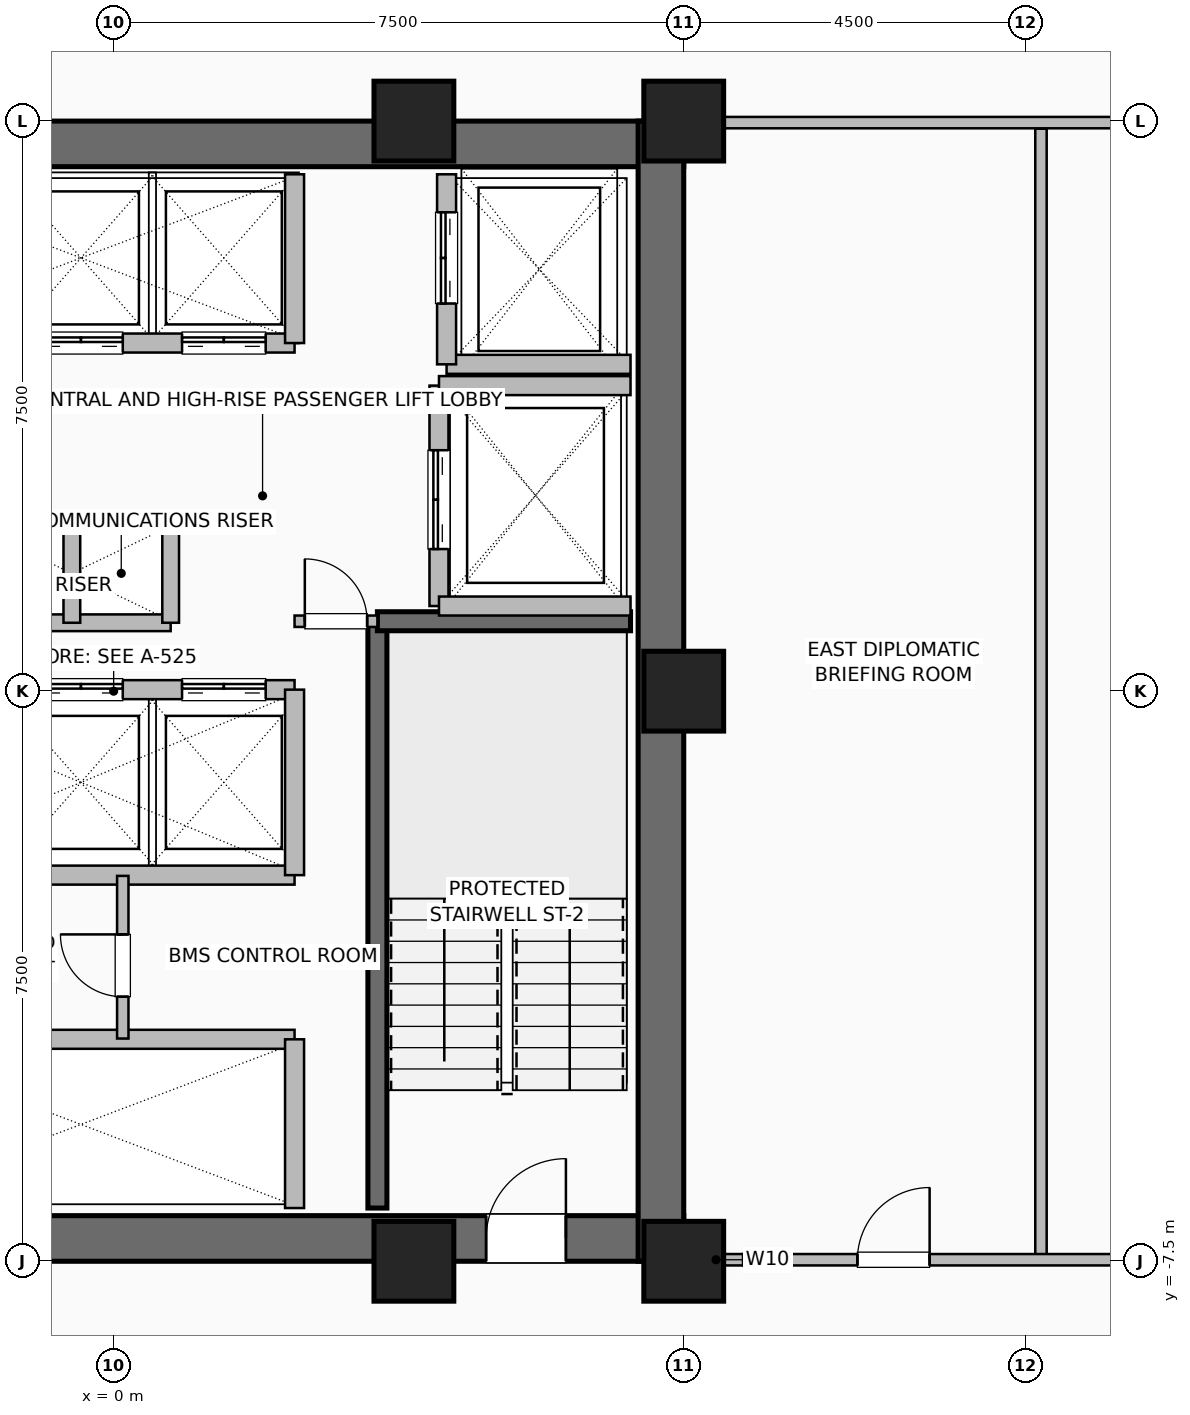
"""IFC4 building model, lengths in metres.
Left out: names, types, materials, properties, quantities, classifications, styles, units other than length and angle.
Written with IfcOpenShell. Run it as: python <this file> out.ifc"""

import sys

from ifc_helpers import new_model, si_unit, direction, frame, frame_2d, origin, origin_2d, place, context, subcontext, project, spatial, rectangle, hollow_rectangle, extrude, element, fill, save


model = new_model("IFC4")
c1 = context("Model", 3, precision=1e-05, world=origin(), true_north=direction((0.0, 1.0)))
c2 = subcontext(c1, "Body", "Model", "MODEL_VIEW")
j1 = project(units=[si_unit("LENGTHUNIT", "METRE"), si_unit("PLANEANGLEUNIT", "RADIAN")], contexts=[c1])
p1 = place(None, origin())
s1 = spatial("IfcSite", under=j1, at=p1, CompositionType="ELEMENT")
p2 = place(p1, origin())
s2 = spatial("IfcBuilding", under=s1, at=p2, CompositionType="ELEMENT")
p3 = place(p2, frame((0.0, 0.0, 97.6)))
s3 = spatial("IfcBuildingStorey", under=s2, at=p3, CompositionType="ELEMENT", Elevation=97.6)
for number, where, z_axis, x_axis in (
    (1, (3.95, -7.5, 0.0), (0.0, 0.0, 1.0), (1.0, 0.0, 0.0)),
    (2, (7.5, -7.5, 0.0), (0.0, 0.0, 1.0), (1.0, 0.0, 0.0)),
    (3, (7.5, 0.0, 0.0), (0.0, 0.0, 1.0), (1.0, 0.0, 0.0)),
    (4, (7.5, 7.5, 0.0), (0.0, 0.0, 1.0), (1.0, 0.0, 0.0)),
    (5, (3.95, 7.5, 0.0), (0.0, 0.0, 1.0), (1.0, 0.0, 0.0)),
):
    element("IfcColumn", number, at=place(p3, frame(where, z_axis=z_axis, x_axis=x_axis)), inside=s3, PredefinedType="COLUMN", context=c2, shape_type="SweptSolid", body=[
        extrude(hollow_rectangle(XDim=1.05, YDim=1.05, WallThickness=0.05, at=origin_2d()), origin(), (0.0, 0.0, 1.0), 3.6),
    ])
p4 = place(p3, frame((-7.5, -7.2, 0.0), z_axis=(0.0, 0.0, 1.0), x_axis=(1.0, 0.0, 0.0)))
e6 = element("IfcWall", 6, at=p4, inside=s3, PredefinedType="SHEAR", context=c2, shape_type="SweptSolid", body=[
    extrude(rectangle(XDim=15.0, YDim=0.6, at=frame_2d((7.5, 0.0))), origin(), (0.0, 0.0, 1.0), 3.36),
])
p5 = place(p4, frame((1.55, 0.0, 0.0)))
e7 = element("IfcOpeningElement", 7, at=p5, cuts=e6, PredefinedType="OPENING", context=c2, shape_type="SweptSolid", body=[
    extrude(rectangle(XDim=1.05, YDim=2.08, at=frame_2d((0.525, 1.04))), frame((0.0, 0.31, 0.0), z_axis=(0.0, -1.0, 0.0), x_axis=(1.0, 0.0, 0.0)), (0.0, 0.0, 1.0), 0.62),
])
p6 = place(p4, frame((12.4, 0.0, 0.0)))
e8 = element("IfcOpeningElement", 8, at=p6, cuts=e6, PredefinedType="OPENING", context=c2, shape_type="SweptSolid", body=[
    extrude(rectangle(XDim=1.05, YDim=2.08, at=frame_2d((0.525, 1.04))), frame((0.0, 0.31, 0.0), z_axis=(0.0, -1.0, 0.0), x_axis=(1.0, 0.0, 0.0)), (0.0, 0.0, 1.0), 0.62),
])
for number, where, z_axis, x_axis in (
    (9, (-7.5, 7.2, 0.0), (0.0, 0.0, 1.0), (1.0, 0.0, 0.0)),
    (10, (7.2, -7.5, 0.0), (0.0, 0.0, 1.0), (0.0, 1.0, 0.0)),
):
    element("IfcWall", number, at=place(p3, frame(where, z_axis=z_axis, x_axis=x_axis)), inside=s3, PredefinedType="SHEAR", context=c2, shape_type="SweptSolid", body=[
        extrude(rectangle(XDim=15.0, YDim=0.6, at=frame_2d((7.5, 0.0))), origin(), (0.0, 0.0, 1.0), 3.36),
    ])
p7 = place(p3, frame((3.47, -6.8, 0.0), z_axis=(0.0, 0.0, 1.0), x_axis=(0.0, 1.0, 0.0)))
e11 = element("IfcWall", 11, at=p7, inside=s3, PredefinedType="SHEAR", context=c2, shape_type="SweptSolid", body=[
    extrude(rectangle(XDim=7.72, YDim=0.25, at=frame_2d((3.86, 0.0))), origin(), (0.0, 0.0, 1.0), 3.36),
])
p8 = place(p3, frame((3.47, 0.92, 0.0), z_axis=(0.0, 0.0, 1.0), x_axis=(1.0, 0.0, 0.0)))
e12 = element("IfcWall", 12, at=p8, inside=s3, PredefinedType="SHEAR", context=c2, shape_type="SweptSolid", body=[
    extrude(rectangle(XDim=3.33, YDim=0.25, at=frame_2d((1.665, 0.0))), origin(), (0.0, 0.0, 1.0), 3.36),
])
for number, where, z_axis, x_axis in (
    (13, (-1.85, 2.2, 0.0), (0.0, 0.0, 1.0), (1.0, 0.0, 0.0)),
    (14, (-1.85, 0.9, 0.0), (0.0, 0.0, 1.0), (1.0, 0.0, 0.0)),
):
    element("IfcWall", number, at=place(p3, frame(where, z_axis=z_axis, x_axis=x_axis)), inside=s3, PredefinedType="PARTITIONING", context=c2, shape_type="SweptSolid", body=[
        extrude(rectangle(XDim=2.6, YDim=0.22, at=frame_2d((1.3, 0.0))), origin(), (0.0, 0.0, 1.0), 3.36),
    ])
for number, where, z_axis, x_axis in (
    (15, (-0.55, 0.9, 0.0), (0.0, 0.0, 1.0), (0.0, 1.0, 0.0)),
    (16, (0.75, 0.9, 0.0), (0.0, 0.0, 1.0), (0.0, 1.0, 0.0)),
):
    element("IfcWall", number, at=place(p3, frame(where, z_axis=z_axis, x_axis=x_axis)), inside=s3, PredefinedType="PARTITIONING", context=c2, shape_type="SweptSolid", body=[
        extrude(rectangle(XDim=1.3, YDim=0.22, at=frame_2d((0.65, 0.0))), origin(), (0.0, 0.0, 1.0), 3.36),
    ])
p9 = place(p3, frame((-3.26, -4.58, 0.0), z_axis=(0.0, 0.0, 1.0), x_axis=(1.0, 0.0, 0.0)))
e17 = element("IfcWall", 17, at=p9, inside=s3, PredefinedType="SHEAR", context=c2, shape_type="SweptSolid", body=[
    extrude(rectangle(XDim=5.64, YDim=0.25, at=frame_2d((2.82, 0.0))), origin(), (0.0, 0.0, 1.0), 3.36),
])
p10 = place(p3, frame((2.38, -6.8, 0.0), z_axis=(0.0, 0.0, 1.0), x_axis=(0.0, 1.0, 0.0)))
e18 = element("IfcWall", 18, at=p10, inside=s3, PredefinedType="SHEAR", context=c2, shape_type="SweptSolid", body=[
    extrude(rectangle(XDim=2.22, YDim=0.25, at=frame_2d((1.11, 0.0))), origin(), (0.0, 0.0, 1.0), 3.36),
])
p11 = place(p3, frame((-3.26, 0.02, 0.0), z_axis=(0.0, 0.0, 1.0), x_axis=(1.0, 0.0, 0.0)))
e19 = element("IfcWall", 19, at=p11, inside=s3, PredefinedType="SHEAR", context=c2, shape_type="SweptSolid", body=[
    extrude(rectangle(XDim=5.64, YDim=0.25, at=frame_2d((2.82, 0.0))), origin(), (0.0, 0.0, 1.0), 3.36),
])
p12 = place(p11, frame((0.4, 0.0, 0.0)))
e20 = element("IfcOpeningElement", 20, at=p12, cuts=e19, PredefinedType="OPENING", context=c2, shape_type="SweptSolid", body=[
    extrude(rectangle(XDim=1.1, YDim=2.2, at=frame_2d((0.55, 1.1))), frame((0.0, 0.135, 0.0), z_axis=(0.0, -1.0, 0.0), x_axis=(1.0, 0.0, 0.0)), (0.0, 0.0, 1.0), 0.27),
])
p13 = place(p11, frame((2.28, 0.0, 0.0)))
e21 = element("IfcOpeningElement", 21, at=p13, cuts=e19, PredefinedType="OPENING", context=c2, shape_type="SweptSolid", body=[
    extrude(rectangle(XDim=1.1, YDim=2.2, at=frame_2d((0.55, 1.1))), frame((0.0, 0.135, 0.0), z_axis=(0.0, -1.0, 0.0), x_axis=(1.0, 0.0, 0.0)), (0.0, 0.0, 1.0), 0.27),
])
p14 = place(p11, frame((4.16, 0.0, 0.0)))
e22 = element("IfcOpeningElement", 22, at=p14, cuts=e19, PredefinedType="OPENING", context=c2, shape_type="SweptSolid", body=[
    extrude(rectangle(XDim=1.1, YDim=2.2, at=frame_2d((0.55, 1.1))), frame((0.0, 0.135, 0.0), z_axis=(0.0, -1.0, 0.0), x_axis=(1.0, 0.0, 0.0)), (0.0, 0.0, 1.0), 0.27),
])
p15 = place(p3, frame((-3.26, -2.42, 0.0), z_axis=(0.0, 0.0, 1.0), x_axis=(1.0, 0.0, 0.0)))
e23 = element("IfcWall", 23, at=p15, inside=s3, PredefinedType="SHEAR", context=c2, shape_type="SweptSolid", body=[
    extrude(rectangle(XDim=5.64, YDim=0.25, at=frame_2d((2.82, 0.0))), origin(), (0.0, 0.0, 1.0), 3.36),
])
p16 = place(p3, frame((2.38, -2.42, 0.0), z_axis=(0.0, 0.0, 1.0), x_axis=(0.0, 1.0, 0.0)))
e24 = element("IfcWall", 24, at=p16, inside=s3, PredefinedType="SHEAR", context=c2, shape_type="SweptSolid", body=[
    extrude(rectangle(XDim=2.44, YDim=0.25, at=frame_2d((1.22, 0.0))), origin(), (0.0, 0.0, 1.0), 3.36),
])
p17 = place(p3, frame((-3.26, 4.58, 0.0), z_axis=(0.0, 0.0, 1.0), x_axis=(1.0, 0.0, 0.0)))
e25 = element("IfcWall", 25, at=p17, inside=s3, PredefinedType="SHEAR", context=c2, shape_type="SweptSolid", body=[
    extrude(rectangle(XDim=5.64, YDim=0.25, at=frame_2d((2.82, 0.0))), origin(), (0.0, 0.0, 1.0), 3.36),
])
p18 = place(p17, frame((0.4, 0.0, 0.0)))
e26 = element("IfcOpeningElement", 26, at=p18, cuts=e25, PredefinedType="OPENING", context=c2, shape_type="SweptSolid", body=[
    extrude(rectangle(XDim=1.1, YDim=2.2, at=frame_2d((0.55, 1.1))), frame((0.0, 0.135, 0.0), z_axis=(0.0, -1.0, 0.0), x_axis=(1.0, 0.0, 0.0)), (0.0, 0.0, 1.0), 0.27),
])
p19 = place(p17, frame((2.28, 0.0, 0.0)))
e27 = element("IfcOpeningElement", 27, at=p19, cuts=e25, PredefinedType="OPENING", context=c2, shape_type="SweptSolid", body=[
    extrude(rectangle(XDim=1.1, YDim=2.2, at=frame_2d((0.55, 1.1))), frame((0.0, 0.135, 0.0), z_axis=(0.0, -1.0, 0.0), x_axis=(1.0, 0.0, 0.0)), (0.0, 0.0, 1.0), 0.27),
])
p20 = place(p17, frame((4.16, 0.0, 0.0)))
e28 = element("IfcOpeningElement", 28, at=p20, cuts=e25, PredefinedType="OPENING", context=c2, shape_type="SweptSolid", body=[
    extrude(rectangle(XDim=1.1, YDim=2.2, at=frame_2d((0.55, 1.1))), frame((0.0, 0.135, 0.0), z_axis=(0.0, -1.0, 0.0), x_axis=(1.0, 0.0, 0.0)), (0.0, 0.0, 1.0), 0.27),
])
p21 = place(p3, frame((2.38, 4.58, 0.0), z_axis=(0.0, 0.0, 1.0), x_axis=(0.0, 1.0, 0.0)))
e29 = element("IfcWall", 29, at=p21, inside=s3, PredefinedType="SHEAR", context=c2, shape_type="SweptSolid", body=[
    extrude(rectangle(XDim=2.22, YDim=0.25, at=frame_2d((1.11, 0.0))), origin(), (0.0, 0.0, 1.0), 3.36),
])
p22 = place(p3, frame((4.38, 4.3, 0.0), z_axis=(0.0, 0.0, 1.0), x_axis=(1.0, 0.0, 0.0)))
e30 = element("IfcWall", 30, at=p22, inside=s3, PredefinedType="SHEAR", context=c2, shape_type="SweptSolid", body=[
    extrude(rectangle(XDim=2.42, YDim=0.25, at=frame_2d((1.21, 0.0))), origin(), (0.0, 0.0, 1.0), 3.36),
])
p23 = place(p3, frame((4.38, 4.3, 0.0), z_axis=(0.0, 0.0, 1.0), x_axis=(0.0, 1.0, 0.0)))
e31 = element("IfcWall", 31, at=p23, inside=s3, PredefinedType="SHEAR", context=c2, shape_type="SweptSolid", body=[
    extrude(rectangle(XDim=2.5, YDim=0.25, at=frame_2d((1.25, 0.0))), origin(), (0.0, 0.0, 1.0), 3.36),
])
p24 = place(p23, frame((0.8, 0.0, 0.0)))
e32 = element("IfcOpeningElement", 32, at=p24, cuts=e31, PredefinedType="OPENING", context=c2, shape_type="SweptSolid", body=[
    extrude(rectangle(XDim=1.2, YDim=2.2, at=frame_2d((0.6, 1.1))), frame((0.0, 0.135, 0.0), z_axis=(0.0, -1.0, 0.0), x_axis=(1.0, 0.0, 0.0)), (0.0, 0.0, 1.0), 0.27),
])
p25 = place(p3, frame((4.28, 1.12, 0.0), z_axis=(0.0, 0.0, 1.0), x_axis=(0.0, 1.0, 0.0)))
e33 = element("IfcWall", 33, at=p25, inside=s3, PredefinedType="SHEAR", context=c2, shape_type="SweptSolid", body=[
    extrude(rectangle(XDim=2.9, YDim=0.25, at=frame_2d((1.45, 0.0))), origin(), (0.0, 0.0, 1.0), 3.36),
])
p26 = place(p25, frame((0.75, 0.0, 0.0)))
e34 = element("IfcOpeningElement", 34, at=p26, cuts=e33, PredefinedType="OPENING", context=c2, shape_type="SweptSolid", body=[
    extrude(rectangle(XDim=1.3, YDim=2.3, at=frame_2d((0.65, 1.15))), frame((0.0, 0.135, 0.0), z_axis=(0.0, -1.0, 0.0), x_axis=(1.0, 0.0, 0.0)), (0.0, 0.0, 1.0), 0.27),
])
for number, where, z_axis, x_axis in (
    (35, (4.28, 1.12, 0.0), (0.0, 0.0, 1.0), (1.0, 0.0, 0.0)),
    (36, (4.28, 4.02, 0.0), (0.0, 0.0, 1.0), (1.0, 0.0, 0.0)),
):
    element("IfcWall", number, at=place(p3, frame(where, z_axis=z_axis, x_axis=x_axis)), inside=s3, PredefinedType="SHEAR", context=c2, shape_type="SweptSolid", body=[
        extrude(rectangle(XDim=2.52, YDim=0.25, at=frame_2d((1.26, 0.0))), origin(), (0.0, 0.0, 1.0), 3.36),
    ])
p27 = place(p3, frame((2.38, 0.92, 0.0), z_axis=(0.0, 0.0, 1.0), x_axis=(1.0, 0.0, 0.0)))
e37 = element("IfcWall", 37, at=p27, inside=s3, PredefinedType="PARTITIONING", context=c2, shape_type="SweptSolid", body=[
    extrude(rectangle(XDim=1.09, YDim=0.15, at=frame_2d((0.545, 0.0))), origin(), (0.0, 0.0, 1.0), 3.36),
])
p28 = place(p27, frame((0.135, 0.0, 0.0)))
e38 = element("IfcOpeningElement", 38, at=p28, cuts=e37, PredefinedType="OPENING", context=c2, shape_type="SweptSolid", body=[
    extrude(rectangle(XDim=0.82, YDim=2.05, at=frame_2d((0.41, 1.025))), frame((0.0, 0.085, 0.0), z_axis=(0.0, -1.0, 0.0), x_axis=(1.0, 0.0, 0.0)), (0.0, 0.0, 1.0), 0.17),
])
p29 = place(p3, frame((0.12, -4.57, 0.0), z_axis=(0.0, 0.0, 1.0), x_axis=(0.0, 1.0, 0.0)))
e39 = element("IfcWall", 39, at=p29, inside=s3, PredefinedType="PARTITIONING", context=c2, shape_type="SweptSolid", body=[
    extrude(rectangle(XDim=2.14, YDim=0.15, at=frame_2d((1.07, 0.0))), origin(), (0.0, 0.0, 1.0), 3.36),
])
p30 = place(p29, frame((0.55, 0.0, 0.0)))
e40 = element("IfcOpeningElement", 40, at=p30, cuts=e39, PredefinedType="OPENING", context=c2, shape_type="SweptSolid", body=[
    extrude(rectangle(XDim=0.82, YDim=2.05, at=frame_2d((0.41, 1.025))), frame((0.0, 0.085, 0.0), z_axis=(0.0, -1.0, 0.0), x_axis=(1.0, 0.0, 0.0)), (0.0, 0.0, 1.0), 0.17),
])
p31 = place(p3, frame((7.45, -7.48, 0.0), z_axis=(0.0, 0.0, 1.0), x_axis=(1.0, 0.0, 0.0)))
e41 = element("IfcWall", 41, at=p31, inside=s3, PredefinedType="PARTITIONING", context=c2, shape_type="SweptSolid", body=[
    extrude(rectangle(XDim=0.95, YDim=0.15, at=frame_2d((0.475, 0.0))), origin(), (0.0, 0.0, 1.0), 3.36),
])
p32 = place(p3, frame((12.2, -7.48, 0.0), z_axis=(0.0, 0.0, 1.0), x_axis=(0.0, 1.0, 0.0)))
e42 = element("IfcWall", 42, at=p32, inside=s3, PredefinedType="PARTITIONING", context=c2, shape_type="SweptSolid", body=[
    extrude(rectangle(XDim=14.88, YDim=0.15, at=frame_2d((7.44, 0.0))), origin(), (0.0, 0.0, 1.0), 3.36),
])
p33 = place(p3, frame((8.28, -7.48, 0.0), z_axis=(0.0, 0.0, 1.0), x_axis=(1.0, 0.0, 0.0)))
e43 = element("IfcWall", 43, at=p33, inside=s3, PredefinedType="PARTITIONING", context=c2, shape_type="SweptSolid", body=[
    extrude(rectangle(XDim=13.54, YDim=0.15, at=frame_2d((6.77, 0.0))), origin(), (0.0, 0.0, 1.0), 3.36),
])
p34 = place(p33, frame((1.505, 0.0, 0.0)))
e44 = element("IfcOpeningElement", 44, at=p34, cuts=e43, PredefinedType="OPENING", context=c2, shape_type="SweptSolid", body=[
    extrude(rectangle(XDim=0.95, YDim=2.06, at=frame_2d((0.475, 1.03))), frame((0.0, 0.085, 0.0), z_axis=(0.0, -1.0, 0.0), x_axis=(1.0, 0.0, 0.0)), (0.0, 0.0, 1.0), 0.17),
])
p35 = place(p33, frame((8.195, 0.0, 0.0)))
e45 = element("IfcOpeningElement", 45, at=p35, cuts=e43, PredefinedType="OPENING", context=c2, shape_type="SweptSolid", body=[
    extrude(rectangle(XDim=0.95, YDim=2.06, at=frame_2d((0.475, 1.03))), frame((0.0, 0.085, 0.0), z_axis=(0.0, -1.0, 0.0), x_axis=(1.0, 0.0, 0.0)), (0.0, 0.0, 1.0), 0.17),
])
p36 = place(p3, frame((7.6, 7.48, 0.0), z_axis=(0.0, 0.0, 1.0), x_axis=(1.0, 0.0, 0.0)))
e46 = element("IfcWall", 46, at=p36, inside=s3, PredefinedType="PARTITIONING", context=c2, shape_type="SweptSolid", body=[
    extrude(rectangle(XDim=14.22, YDim=0.15, at=frame_2d((7.11, 0.0))), origin(), (0.0, 0.0, 1.0), 3.36),
])
p37 = place(p6, origin())
e47 = element("IfcDoor", 47, at=p37, inside=s3, OperationType="SINGLE_SWING_RIGHT", PredefinedType="DOOR", context=c2, shape_type="SweptSolid", body=[
    extrude(rectangle(XDim=1.05, YDim=2.08, at=frame_2d((0.525, 1.04))), frame((0.0, 0.025, 0.0), z_axis=(0.0, -1.0, 0.0), x_axis=(1.0, 0.0, 0.0)), (0.0, 0.0, 1.0), 0.05),
])
fill(e8, e47)
p38 = place(p13, origin())
e48 = element("IfcDoor", 48, at=p38, inside=s3, OperationType="DOUBLE_DOOR_SLIDING", PredefinedType="DOOR", context=c2, shape_type="SweptSolid", body=[
    extrude(rectangle(XDim=1.1, YDim=2.2, at=frame_2d((0.55, 1.1))), frame((0.0, 0.025, 0.0), z_axis=(0.0, -1.0, 0.0), x_axis=(1.0, 0.0, 0.0)), (0.0, 0.0, 1.0), 0.05),
])
fill(e21, e48)
p39 = place(p14, origin())
e49 = element("IfcDoor", 49, at=p39, inside=s3, OperationType="DOUBLE_DOOR_SLIDING", PredefinedType="DOOR", context=c2, shape_type="SweptSolid", body=[
    extrude(rectangle(XDim=1.1, YDim=2.2, at=frame_2d((0.55, 1.1))), frame((0.0, 0.025, 0.0), z_axis=(0.0, -1.0, 0.0), x_axis=(1.0, 0.0, 0.0)), (0.0, 0.0, 1.0), 0.05),
])
fill(e22, e49)
p40 = place(p19, origin())
e50 = element("IfcDoor", 50, at=p40, inside=s3, OperationType="DOUBLE_DOOR_SLIDING", PredefinedType="DOOR", context=c2, shape_type="SweptSolid", body=[
    extrude(rectangle(XDim=1.1, YDim=2.2, at=frame_2d((0.55, 1.1))), frame((0.0, 0.025, 0.0), z_axis=(0.0, -1.0, 0.0), x_axis=(1.0, 0.0, 0.0)), (0.0, 0.0, 1.0), 0.05),
])
fill(e27, e50)
p41 = place(p20, origin())
e51 = element("IfcDoor", 51, at=p41, inside=s3, OperationType="DOUBLE_DOOR_SLIDING", PredefinedType="DOOR", context=c2, shape_type="SweptSolid", body=[
    extrude(rectangle(XDim=1.1, YDim=2.2, at=frame_2d((0.55, 1.1))), frame((0.0, 0.025, 0.0), z_axis=(0.0, -1.0, 0.0), x_axis=(1.0, 0.0, 0.0)), (0.0, 0.0, 1.0), 0.05),
])
fill(e28, e51)
p42 = place(p24, origin())
e52 = element("IfcDoor", 52, at=p42, inside=s3, OperationType="DOUBLE_DOOR_SLIDING", PredefinedType="DOOR", context=c2, shape_type="SweptSolid", body=[
    extrude(rectangle(XDim=1.2, YDim=2.2, at=frame_2d((0.6, 1.1))), frame((0.0, 0.025, 0.0), z_axis=(0.0, -1.0, 0.0), x_axis=(1.0, 0.0, 0.0)), (0.0, 0.0, 1.0), 0.05),
])
fill(e32, e52)
p43 = place(p26, origin())
e53 = element("IfcDoor", 53, at=p43, inside=s3, OperationType="DOUBLE_DOOR_SLIDING", PredefinedType="DOOR", context=c2, shape_type="SweptSolid", body=[
    extrude(rectangle(XDim=1.3, YDim=2.3, at=frame_2d((0.65, 1.15))), frame((0.0, 0.025, 0.0), z_axis=(0.0, -1.0, 0.0), x_axis=(1.0, 0.0, 0.0)), (0.0, 0.0, 1.0), 0.05),
])
fill(e34, e53)
p44 = place(p28, origin())
e54 = element("IfcDoor", 54, at=p44, inside=s3, OperationType="SINGLE_SWING_LEFT", PredefinedType="DOOR", context=c2, shape_type="SweptSolid", body=[
    extrude(rectangle(XDim=0.82, YDim=2.05, at=frame_2d((0.41, 1.025))), frame((0.0, 0.025, 0.0), z_axis=(0.0, -1.0, 0.0), x_axis=(1.0, 0.0, 0.0)), (0.0, 0.0, 1.0), 0.05),
])
fill(e38, e54)
p45 = place(p30, origin())
e55 = element("IfcDoor", 55, at=p45, inside=s3, OperationType="SINGLE_SWING_RIGHT", PredefinedType="DOOR", context=c2, shape_type="SweptSolid", body=[
    extrude(rectangle(XDim=0.82, YDim=2.05, at=frame_2d((0.41, 1.025))), frame((0.0, 0.025, 0.0), z_axis=(0.0, -1.0, 0.0), x_axis=(1.0, 0.0, 0.0)), (0.0, 0.0, 1.0), 0.05),
])
fill(e40, e55)
p46 = place(p34, origin())
e56 = element("IfcDoor", 56, at=p46, inside=s3, OperationType="SINGLE_SWING_RIGHT", PredefinedType="DOOR", context=c2, shape_type="SweptSolid", body=[
    extrude(rectangle(XDim=0.95, YDim=2.06, at=frame_2d((0.475, 1.03))), frame((0.0, 0.025, 0.0), z_axis=(0.0, -1.0, 0.0), x_axis=(1.0, 0.0, 0.0)), (0.0, 0.0, 1.0), 0.05),
])
fill(e44, e56)
save(model, sys.argv[1])
